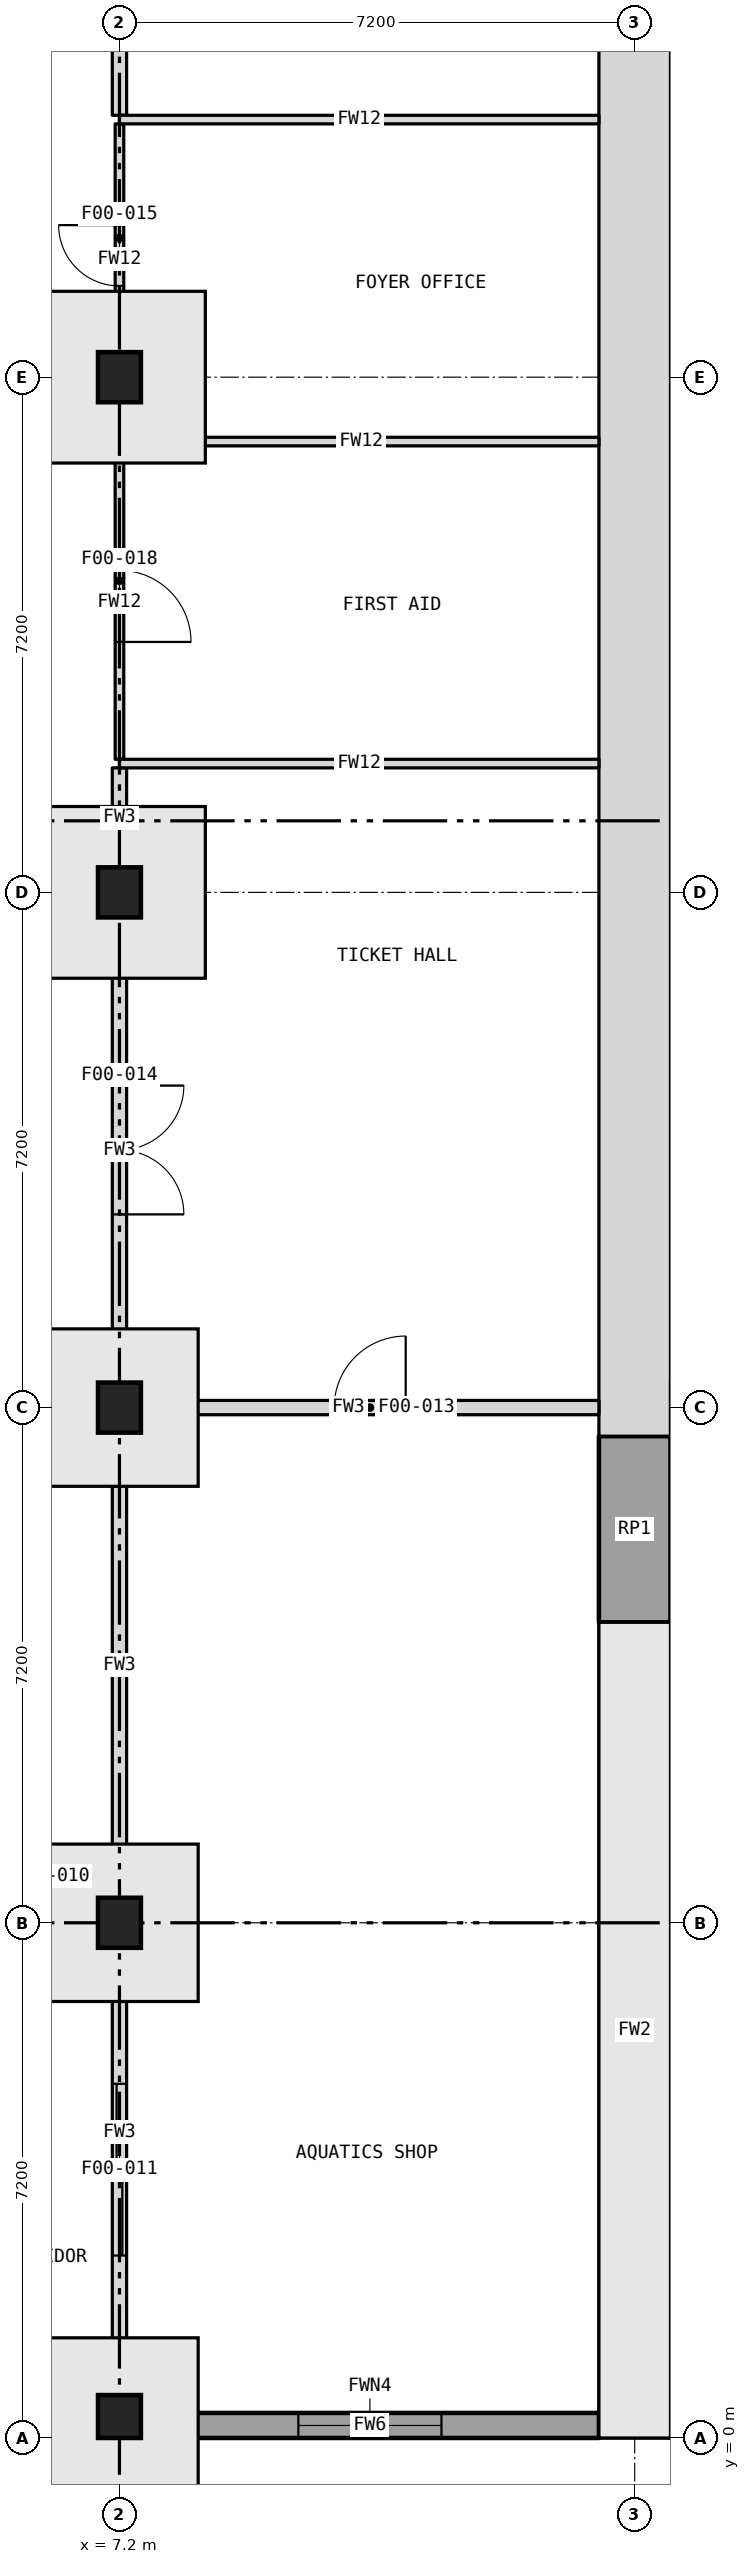
"""IFC4 building model, lengths in metres.
Left out: names, types, materials, properties, quantities, classifications, styles, units other than length and angle.
Written with IfcOpenShell. Run it as: python <this file> out.ifc"""

import sys

from ifc_helpers import new_model, si_unit, direction, frame, frame_2d, origin, origin_2d, place, context, subcontext, project, spatial, rectangle, extrude, element, fill, save


model = new_model("IFC4")
c1 = context("Model", 3, precision=1e-05, world=origin(), true_north=direction((0.0, 1.0)))
c2 = subcontext(c1, "Body", "Model", "MODEL_VIEW")
j1 = project(units=[si_unit("LENGTHUNIT", "METRE"), si_unit("PLANEANGLEUNIT", "RADIAN")], contexts=[c1])
p1 = place(None, origin())
s1 = spatial("IfcSite", under=j1, at=p1, CompositionType="ELEMENT")
p2 = place(p1, origin())
s2 = spatial("IfcBuilding", under=s1, at=p2, CompositionType="ELEMENT")
p3 = place(p2, origin())
s3 = spatial("IfcBuildingStorey", under=s2, at=p3, CompositionType="ELEMENT", Elevation=0.0)
p4 = place(p3, frame((14.4, 11.4, 0.0), z_axis=(0.0, 0.0, 1.0), x_axis=(0.0, 1.0, 0.0)))
e1 = element("IfcWall", 1, at=p4, inside=s3, PredefinedType="SOLIDWALL", context=c2, shape_type="SweptSolid", body=[
    extrude(rectangle(XDim=2.6, YDim=1.0, at=frame_2d((1.3, 0.0))), origin(), (0.0, 0.0, 1.0), 6.0),
])
p5 = place(p3, frame((14.4, 14.0, 0.0), z_axis=(0.0, 0.0, 1.0), x_axis=(0.0, 1.0, 0.0)))
e2 = element("IfcWall", 2, at=p5, inside=s3, PredefinedType="SOLIDWALL", context=c2, shape_type="SweptSolid", body=[
    extrude(rectangle(XDim=49.9, YDim=1.0, at=frame_2d((24.95, 0.0))), origin(), (0.0, 0.0, 1.0), 6.0),
])
p6 = place(p5, frame((30.9, 0.0, 0.0)))
e3 = element("IfcOpeningElement", 3, at=p6, cuts=e2, PredefinedType="OPENING", context=c2, shape_type="SweptSolid", body=[
    extrude(rectangle(XDim=2.4, YDim=2.7, at=frame_2d((1.2, 1.35))), frame((0.0, 0.51, 0.0), z_axis=(0.0, -1.0, 0.0), x_axis=(1.0, 0.0, 0.0)), (0.0, 0.0, 1.0), 1.02),
])
p7 = place(p3, frame((7.2, 0.3, -0.45), z_axis=(0.0, 0.0, 1.0), x_axis=(1.0, 0.0, 0.0)))
e4 = element("IfcColumn", 4, at=p7, inside=s3, PredefinedType="COLUMN", context=c2, shape_type="SweptSolid", body=[
    extrude(rectangle(XDim=0.6, YDim=0.6, at=origin_2d()), origin(), (0.0, 0.0, 1.0), 6.45),
])
for number, where, z_axis, x_axis in (
    (5, (7.2, 7.2, -0.405), (0.0, 0.0, 1.0), (1.0, 0.0, 0.0)),
    (6, (7.2, 14.4, -0.405), (0.0, 0.0, 1.0), (1.0, 0.0, 0.0)),
    (7, (7.2, 21.6, -0.405), (0.0, 0.0, 1.0), (1.0, 0.0, 0.0)),
    (8, (7.2, 28.8, -0.405), (0.0, 0.0, 1.0), (1.0, 0.0, 0.0)),
):
    element("IfcColumn", number, at=place(p3, frame(where, z_axis=z_axis, x_axis=x_axis)), inside=s3, PredefinedType="COLUMN", context=c2, shape_type="SweptSolid", body=[
        extrude(rectangle(XDim=0.6, YDim=0.7, at=origin_2d()), origin(), (0.0, 0.0, 1.0), 6.405),
    ])
p8 = place(p3, frame((14.4, 0.0, 0.0), z_axis=(0.0, 0.0, 1.0), x_axis=(0.0, 1.0, 0.0)))
e9 = element("IfcWall", 9, at=p8, inside=s3, PredefinedType="SOLIDWALL", context=c2, shape_type="SweptSolid", body=[
    extrude(rectangle(XDim=11.4, YDim=1.0, at=frame_2d((5.7, 0.0))), origin(), (0.0, 0.0, 1.0), 6.0),
])
p9 = place(p3, frame((0.6, 0.175, 0.0), z_axis=(0.0, 0.0, 1.0), x_axis=(1.0, 0.0, 0.0)))
e10 = element("IfcWall", 10, at=p9, inside=s3, PredefinedType="SOLIDWALL", context=c2, shape_type="SweptSolid", body=[
    extrude(rectangle(XDim=6.3, YDim=0.35, at=frame_2d((3.15, 0.0))), origin(), (0.0, 0.0, 1.0), 5.675),
])
p10 = place(p3, frame((7.5, 0.175, 0.0), z_axis=(0.0, 0.0, 1.0), x_axis=(1.0, 0.0, 0.0)))
e11 = element("IfcWall", 11, at=p10, inside=s3, PredefinedType="SOLIDWALL", context=c2, shape_type="SweptSolid", body=[
    extrude(rectangle(XDim=6.4, YDim=0.35, at=frame_2d((3.2, 0.0))), origin(), (0.0, 0.0, 1.0), 5.675),
])
p11 = place(p10, frame((2.2, 0.0, 0.9)))
e12 = element("IfcOpeningElement", 12, at=p11, cuts=e11, PredefinedType="OPENING", context=c2, shape_type="SweptSolid", body=[
    extrude(rectangle(XDim=2.0, YDim=2.4, at=frame_2d((1.0, 1.2))), frame((0.0, 0.185, 0.0), z_axis=(0.0, -1.0, 0.0), x_axis=(1.0, 0.0, 0.0)), (0.0, 0.0, 1.0), 0.37),
])
p12 = place(p3, frame((7.2, 23.46, 0.0), z_axis=(0.0, 0.0, 1.0), x_axis=(0.0, 1.0, 0.0)))
e13 = element("IfcWall", 13, at=p12, inside=s3, PredefinedType="PARTITIONING", context=c2, shape_type="SweptSolid", body=[
    extrude(rectangle(XDim=4.99, YDim=0.12, at=frame_2d((2.495, 0.0))), origin(), (0.0, 0.0, 1.0), 5.675),
])
p13 = place(p12, frame((1.64, 0.0, 0.0)))
e14 = element("IfcOpeningElement", 14, at=p13, cuts=e13, PredefinedType="OPENING", context=c2, shape_type="SweptSolid", body=[
    extrude(rectangle(XDim=1.0, YDim=2.1, at=frame_2d((0.5, 1.05))), frame((0.0, 0.07, 0.0), z_axis=(0.0, -1.0, 0.0), x_axis=(1.0, 0.0, 0.0)), (0.0, 0.0, 1.0), 0.14),
])
p14 = place(p3, frame((7.2, 29.15, 0.0), z_axis=(0.0, 0.0, 1.0), x_axis=(0.0, 1.0, 0.0)))
e15 = element("IfcWall", 15, at=p14, inside=s3, PredefinedType="PARTITIONING", context=c2, shape_type="SweptSolid", body=[
    extrude(rectangle(XDim=3.19, YDim=0.12, at=frame_2d((1.595, 0.0))), origin(), (0.0, 0.0, 1.0), 5.675),
])
p15 = place(p14, frame((0.925, 0.0, 0.0)))
e16 = element("IfcOpeningElement", 16, at=p15, cuts=e15, PredefinedType="OPENING", context=c2, shape_type="SweptSolid", body=[
    extrude(rectangle(XDim=0.85, YDim=2.1, at=frame_2d((0.425, 1.05))), frame((0.0, 0.07, 0.0), z_axis=(0.0, -1.0, 0.0), x_axis=(1.0, 0.0, 0.0)), (0.0, 0.0, 1.0), 0.14),
])
p16 = place(p3, frame((7.2, 0.6, 0.0), z_axis=(0.0, 0.0, 1.0), x_axis=(0.0, 1.0, 0.0)))
e17 = element("IfcWall", 17, at=p16, inside=s3, PredefinedType="PARTITIONING", context=c2, shape_type="SweptSolid", body=[
    extrude(rectangle(XDim=6.25, YDim=0.2, at=frame_2d((3.125, 0.0))), origin(), (0.0, 0.0, 1.0), 5.675),
])
p17 = place(p16, frame((1.95, 0.0, 0.0)))
e18 = element("IfcOpeningElement", 18, at=p17, cuts=e17, PredefinedType="OPENING", context=c2, shape_type="SweptSolid", body=[
    extrude(rectangle(XDim=2.4, YDim=2.1, at=frame_2d((1.2, 1.05))), frame((0.0, 0.11, 0.0), z_axis=(0.0, -1.0, 0.0), x_axis=(1.0, 0.0, 0.0)), (0.0, 0.0, 1.0), 0.22),
])
p18 = place(p3, frame((7.2, 7.55, 0.0), z_axis=(0.0, 0.0, 1.0), x_axis=(0.0, 1.0, 0.0)))
e19 = element("IfcWall", 19, at=p18, inside=s3, PredefinedType="PARTITIONING", context=c2, shape_type="SweptSolid", body=[
    extrude(rectangle(XDim=6.5, YDim=0.2, at=frame_2d((3.25, 0.0))), origin(), (0.0, 0.0, 1.0), 5.675),
])
p19 = place(p3, frame((7.2, 14.75, 0.0), z_axis=(0.0, 0.0, 1.0), x_axis=(0.0, 1.0, 0.0)))
e20 = element("IfcWall", 20, at=p19, inside=s3, PredefinedType="PARTITIONING", context=c2, shape_type="SweptSolid", body=[
    extrude(rectangle(XDim=6.5, YDim=0.2, at=frame_2d((3.25, 0.0))), origin(), (0.0, 0.0, 1.0), 5.675),
])
p20 = place(p19, frame((2.35, 0.0, 0.0)))
e21 = element("IfcOpeningElement", 21, at=p20, cuts=e20, PredefinedType="OPENING", context=c2, shape_type="SweptSolid", body=[
    extrude(rectangle(XDim=1.8, YDim=2.1, at=frame_2d((0.9, 1.05))), frame((0.0, 0.11, 0.0), z_axis=(0.0, -1.0, 0.0), x_axis=(1.0, 0.0, 0.0)), (0.0, 0.0, 1.0), 0.22),
])
p21 = place(p3, frame((7.2, 21.95, 0.0), z_axis=(0.0, 0.0, 1.0), x_axis=(0.0, 1.0, 0.0)))
e22 = element("IfcWall", 22, at=p21, inside=s3, PredefinedType="PARTITIONING", context=c2, shape_type="SweptSolid", body=[
    extrude(rectangle(XDim=1.39, YDim=0.2, at=frame_2d((0.695, 0.0))), origin(), (0.0, 0.0, 1.0), 5.675),
])
p22 = place(p3, frame((7.2, 32.46, 0.0), z_axis=(0.0, 0.0, 1.0), x_axis=(0.0, 1.0, 0.0)))
e23 = element("IfcWall", 23, at=p22, inside=s3, PredefinedType="PARTITIONING", context=c2, shape_type="SweptSolid", body=[
    extrude(rectangle(XDim=3.19, YDim=0.2, at=frame_2d((1.595, 0.0))), origin(), (0.0, 0.0, 1.0), 5.675),
])
p23 = place(p3, frame((4.2, 7.85, 0.0), z_axis=(0.0, 0.0, 1.0), x_axis=(1.0, 0.0, 0.0)))
e24 = element("IfcWall", 24, at=p23, inside=s3, PredefinedType="PARTITIONING", context=c2, shape_type="SweptSolid", body=[
    extrude(rectangle(XDim=2.9, YDim=0.2, at=frame_2d((1.45, 0.0))), origin(), (0.0, 0.0, 1.0), 5.675),
])
p24 = place(p23, frame((0.9, 0.0, 0.0)))
e25 = element("IfcOpeningElement", 25, at=p24, cuts=e24, PredefinedType="OPENING", context=c2, shape_type="SweptSolid", body=[
    extrude(rectangle(XDim=1.0, YDim=2.1, at=frame_2d((0.5, 1.05))), frame((0.0, 0.11, 0.0), z_axis=(0.0, -1.0, 0.0), x_axis=(1.0, 0.0, 0.0)), (0.0, 0.0, 1.0), 0.22),
])
p25 = place(p3, frame((0.6, 14.4, 0.0), z_axis=(0.0, 0.0, 1.0), x_axis=(1.0, 0.0, 0.0)))
e26 = element("IfcWall", 26, at=p25, inside=s3, PredefinedType="PARTITIONING", context=c2, shape_type="SweptSolid", body=[
    extrude(rectangle(XDim=6.3, YDim=0.2, at=frame_2d((3.15, 0.0))), origin(), (0.0, 0.0, 1.0), 5.675),
])
p26 = place(p25, frame((2.25, 0.0, 0.0)))
e27 = element("IfcOpeningElement", 27, at=p26, cuts=e26, PredefinedType="OPENING", context=c2, shape_type="SweptSolid", body=[
    extrude(rectangle(XDim=1.8, YDim=2.1, at=frame_2d((0.9, 1.05))), frame((0.0, 0.11, 0.0), z_axis=(0.0, -1.0, 0.0), x_axis=(1.0, 0.0, 0.0)), (0.0, 0.0, 1.0), 0.22),
])
p27 = place(p3, frame((7.5, 14.4, 0.0), z_axis=(0.0, 0.0, 1.0), x_axis=(1.0, 0.0, 0.0)))
e28 = element("IfcWall", 28, at=p27, inside=s3, PredefinedType="PARTITIONING", context=c2, shape_type="SweptSolid", body=[
    extrude(rectangle(XDim=6.4, YDim=0.2, at=frame_2d((3.2, 0.0))), origin(), (0.0, 0.0, 1.0), 5.675),
])
p28 = place(p27, frame((2.7, 0.0, 0.0)))
e29 = element("IfcOpeningElement", 29, at=p28, cuts=e28, PredefinedType="OPENING", context=c2, shape_type="SweptSolid", body=[
    extrude(rectangle(XDim=1.0, YDim=2.1, at=frame_2d((0.5, 1.05))), frame((0.0, 0.11, 0.0), z_axis=(0.0, -1.0, 0.0), x_axis=(1.0, 0.0, 0.0)), (0.0, 0.0, 1.0), 0.22),
])
p29 = place(p3, frame((7.2, 23.4, 0.0), z_axis=(0.0, 0.0, 1.0), x_axis=(1.0, 0.0, 0.0)))
e30 = element("IfcWall", 30, at=p29, inside=s3, PredefinedType="PARTITIONING", context=c2, shape_type="SweptSolid", body=[
    extrude(rectangle(XDim=6.7, YDim=0.12, at=frame_2d((3.35, 0.0))), origin(), (0.0, 0.0, 1.0), 5.675),
])
p30 = place(p3, frame((7.26, 27.9, 0.0), z_axis=(0.0, 0.0, 1.0), x_axis=(1.0, 0.0, 0.0)))
e31 = element("IfcWall", 31, at=p30, inside=s3, PredefinedType="PARTITIONING", context=c2, shape_type="SweptSolid", body=[
    extrude(rectangle(XDim=6.64, YDim=0.12, at=frame_2d((3.32, 0.0))), origin(), (0.0, 0.0, 1.0), 5.675),
])
p31 = place(p3, frame((7.2, 32.4, 0.0), z_axis=(0.0, 0.0, 1.0), x_axis=(1.0, 0.0, 0.0)))
e32 = element("IfcWall", 32, at=p31, inside=s3, PredefinedType="PARTITIONING", context=c2, shape_type="SweptSolid", body=[
    extrude(rectangle(XDim=6.7, YDim=0.12, at=frame_2d((3.35, 0.0))), origin(), (0.0, 0.0, 1.0), 5.675),
])
p32 = place(p11, origin())
e33 = element("IfcWindow", 33, at=p32, inside=s3, PartitioningType="DOUBLE_PANEL_VERTICAL", PredefinedType="WINDOW", context=c2, shape_type="SweptSolid", body=[
    extrude(rectangle(XDim=2.0, YDim=2.4, at=frame_2d((1.0, 1.2))), frame((0.0, 0.135, 0.0), z_axis=(0.0, -1.0, 0.0), x_axis=(1.0, 0.0, 0.0)), (0.0, 0.0, 1.0), 0.06),
])
fill(e12, e33)
p33 = place(p17, origin())
e34 = element("IfcDoor", 34, at=p33, inside=s3, OperationType="DOUBLE_DOOR_SLIDING", PredefinedType="DOOR", context=c2, shape_type="SweptSolid", body=[
    extrude(rectangle(XDim=2.4, YDim=2.1, at=frame_2d((1.2, 1.05))), frame((0.0, 0.025, 0.0), z_axis=(0.0, -1.0, 0.0), x_axis=(1.0, 0.0, 0.0)), (0.0, 0.0, 1.0), 0.05),
])
fill(e18, e34)
p34 = place(p28, origin())
e35 = element("IfcDoor", 35, at=p34, inside=s3, OperationType="SINGLE_SWING_RIGHT", PredefinedType="DOOR", context=c2, shape_type="SweptSolid", body=[
    extrude(rectangle(XDim=1.0, YDim=2.1, at=frame_2d((0.5, 1.05))), frame((0.0, 0.025, 0.0), z_axis=(0.0, -1.0, 0.0), x_axis=(1.0, 0.0, 0.0)), (0.0, 0.0, 1.0), 0.05),
])
fill(e29, e35)
p35 = place(p20, frame((1.8, 0.0, 0.0), z_axis=(0.0, 0.0, 1.0), x_axis=(-1.0, 0.0, 0.0)))
e36 = element("IfcDoor", 36, at=p35, inside=s3, OperationType="DOUBLE_DOOR_SINGLE_SWING", PredefinedType="DOOR", context=c2, shape_type="SweptSolid", body=[
    extrude(rectangle(XDim=1.8, YDim=2.1, at=frame_2d((0.9, 1.05))), frame((0.0, 0.025, 0.0), z_axis=(0.0, -1.0, 0.0), x_axis=(1.0, 0.0, 0.0)), (0.0, 0.0, 1.0), 0.05),
])
fill(e21, e36)
p36 = place(p15, origin())
e37 = element("IfcDoor", 37, at=p36, inside=s3, OperationType="SINGLE_SWING_RIGHT", PredefinedType="DOOR", context=c2, shape_type="SweptSolid", body=[
    extrude(rectangle(XDim=0.85, YDim=2.1, at=frame_2d((0.425, 1.05))), frame((0.0, 0.025, 0.0), z_axis=(0.0, -1.0, 0.0), x_axis=(1.0, 0.0, 0.0)), (0.0, 0.0, 1.0), 0.05),
])
fill(e16, e37)
p37 = place(p13, frame((1.0, 0.0, 0.0), z_axis=(0.0, 0.0, 1.0), x_axis=(-1.0, 0.0, 0.0)))
e38 = element("IfcDoor", 38, at=p37, inside=s3, OperationType="SINGLE_SWING_RIGHT", PredefinedType="DOOR", context=c2, shape_type="SweptSolid", body=[
    extrude(rectangle(XDim=1.0, YDim=2.1, at=frame_2d((0.5, 1.05))), frame((0.0, 0.025, 0.0), z_axis=(0.0, -1.0, 0.0), x_axis=(1.0, 0.0, 0.0)), (0.0, 0.0, 1.0), 0.05),
])
fill(e14, e38)
save(model, sys.argv[1])
